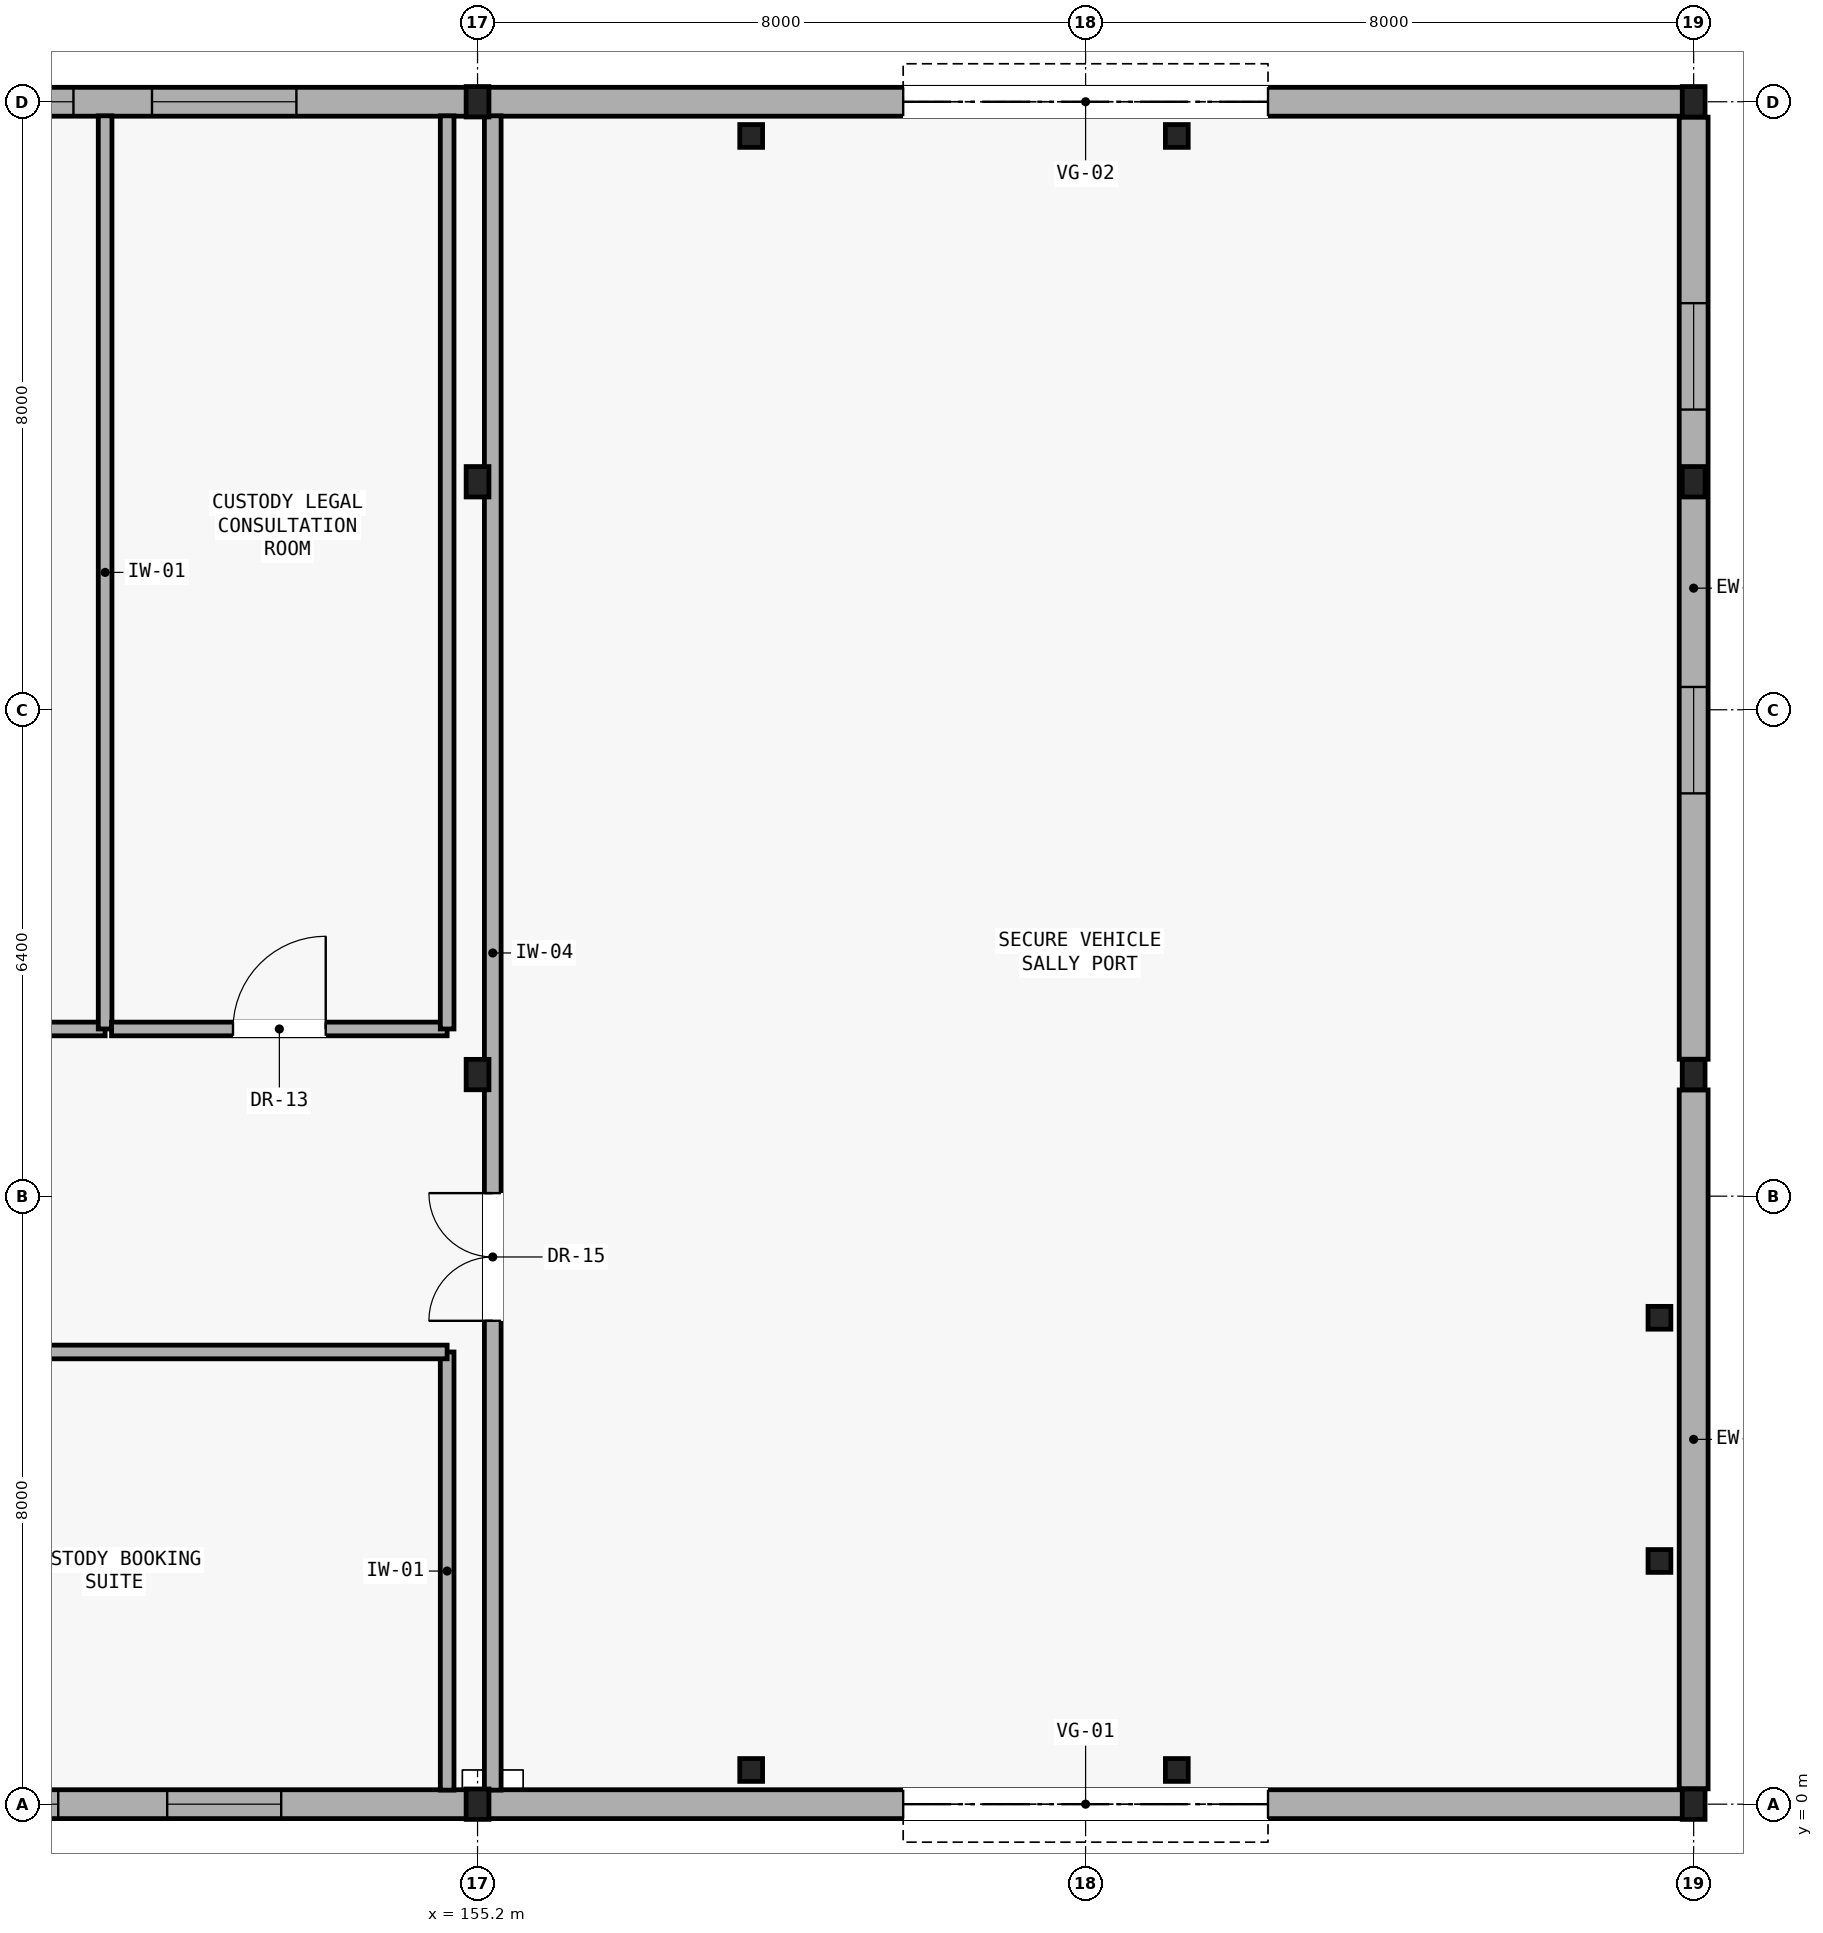
"""IFC4 building model, lengths in metres.
Left out: names, types, materials, properties, quantities, classifications, styles, units other than length and angle.
Written with IfcOpenShell. Run it as: python <this file> out.ifc"""

import sys

from ifc_helpers import new_model, si_unit, direction, frame, frame_2d, origin, origin_2d, place, context, subcontext, project, spatial, rectangle, i_section, extrude, element, fill, save


model = new_model("IFC4")
c1 = context("Model", 3, precision=1e-05, world=origin(), true_north=direction((0.0, 1.0)))
c2 = subcontext(c1, "Body", "Model", "MODEL_VIEW")
j1 = project(units=[si_unit("LENGTHUNIT", "METRE"), si_unit("PLANEANGLEUNIT", "RADIAN")], contexts=[c1])
p1 = place(None, origin())
s1 = spatial("IfcSite", under=j1, at=p1, CompositionType="ELEMENT")
p2 = place(p1, origin())
s2 = spatial("IfcBuilding", under=s1, at=p2, CompositionType="ELEMENT")
p3 = place(p2, origin())
s3 = spatial("IfcBuildingStorey", under=s2, at=p3, CompositionType="ELEMENT", Elevation=0.0)
for number, where, z_axis, x_axis in (
    (1, (155.2, 22.4, -0.27), (0.0, 0.0, 1.0), (1.0, 0.0, 0.0)),
    (2, (155.2, 0.0, -0.27), (0.0, 0.0, 1.0), (1.0, 0.0, 0.0)),
    (3, (155.2, 9.6, -0.27), (0.0, 0.0, 1.0), (1.0, 0.0, 0.0)),
    (4, (155.2, 17.4, -0.27), (0.0, 0.0, 1.0), (1.0, 0.0, 0.0)),
    (5, (171.2, 22.4, -0.27), (0.0, 0.0, 1.0), (1.0, 0.0, 0.0)),
    (6, (171.2, 0.0, -0.27), (0.0, 0.0, 1.0), (1.0, 0.0, 0.0)),
    (7, (171.2, 9.6, -0.27), (0.0, 0.0, 1.0), (1.0, 0.0, 0.0)),
    (8, (171.2, 17.4, -0.27), (0.0, 0.0, 1.0), (1.0, 0.0, 0.0)),
):
    element("IfcColumn", number, at=place(p3, frame(where, z_axis=z_axis, x_axis=x_axis)), inside=s3, PredefinedType="COLUMN", context=c2, shape_type="SweptSolid", body=[
        extrude(i_section(OverallWidth=0.3, OverallDepth=0.4, WebThickness=0.013, FlangeThickness=0.024, FilletRadius=0.027, at=origin_2d()), origin(), (0.0, 0.0, 1.0), 5.52),
    ])
for number, where, z_axis, x_axis in (
    (9, (158.8, 0.45, -0.27), (0.0, 0.0, 1.0), (1.0, 0.0, 0.0)),
    (10, (164.4, 0.45, -0.27), (0.0, 0.0, 1.0), (1.0, 0.0, 0.0)),
    (11, (158.8, 21.95, -0.27), (0.0, 0.0, 1.0), (1.0, 0.0, 0.0)),
    (12, (164.4, 21.95, -0.27), (0.0, 0.0, 1.0), (1.0, 0.0, 0.0)),
):
    element("IfcColumn", number, at=place(p3, frame(where, z_axis=z_axis, x_axis=x_axis)), inside=s3, PredefinedType="COLUMN", context=c2, shape_type="SweptSolid", body=[
        extrude(i_section(OverallWidth=0.3, OverallDepth=0.3, WebThickness=0.011, FlangeThickness=0.019, FilletRadius=0.027, at=origin_2d()), origin(), (0.0, 0.0, 1.0), 3.92),
    ])
for number, where, z_axis, x_axis in (
    (13, (170.75, 3.2, -0.27), (0.0, 0.0, 1.0), (1.0, 0.0, 0.0)),
    (14, (170.75, 6.4, -0.27), (0.0, 0.0, 1.0), (1.0, 0.0, 0.0)),
):
    element("IfcColumn", number, at=place(p3, frame(where, z_axis=z_axis, x_axis=x_axis)), inside=s3, PredefinedType="COLUMN", context=c2, shape_type="SweptSolid", body=[
        extrude(i_section(OverallWidth=0.3, OverallDepth=0.3, WebThickness=0.011, FlangeThickness=0.019, FilletRadius=0.027, at=origin_2d()), origin(), (0.0, 0.0, 1.0), 3.82),
    ])
p4 = place(p3, frame((145.609, 0.0, 0.0), z_axis=(0.0, 0.0, 1.0), x_axis=(1.0, 0.0, 0.0)))
e15 = element("IfcWall", 15, at=p4, inside=s3, PredefinedType="SOLIDWALL", context=c2, shape_type="SweptSolid", body=[
    extrude(rectangle(XDim=9.583, YDim=0.38, at=frame_2d((4.791, 0.0))), origin(), (0.0, 0.0, 1.0), 4.67),
])
p5 = place(p4, frame((2.575, 0.0, 1.7)))
e16 = element("IfcOpeningElement", 16, at=p5, cuts=e15, PredefinedType="OPENING", context=c2, shape_type="SweptSolid", body=[
    extrude(rectangle(XDim=1.5, YDim=0.7, at=frame_2d((0.75, 0.35))), frame((0.0, 0.2, 0.0), z_axis=(0.0, -1.0, 0.0), x_axis=(1.0, 0.0, 0.0)), (0.0, 0.0, 1.0), 0.4),
])
p6 = place(p4, frame((5.508, 0.0, 1.7)))
e17 = element("IfcOpeningElement", 17, at=p6, cuts=e15, PredefinedType="OPENING", context=c2, shape_type="SweptSolid", body=[
    extrude(rectangle(XDim=1.5, YDim=0.7, at=frame_2d((0.75, 0.35))), frame((0.0, 0.2, 0.0), z_axis=(0.0, -1.0, 0.0), x_axis=(1.0, 0.0, 0.0)), (0.0, 0.0, 1.0), 0.4),
])
p7 = place(p3, frame((145.609, 22.4, 0.0), z_axis=(0.0, 0.0, 1.0), x_axis=(1.0, 0.0, 0.0)))
e18 = element("IfcWall", 18, at=p7, inside=s3, PredefinedType="SOLIDWALL", context=c2, shape_type="SweptSolid", body=[
    extrude(rectangle(XDim=9.583, YDim=0.38, at=frame_2d((4.791, 0.0))), origin(), (0.0, 0.0, 1.0), 4.67),
])
p8 = place(p7, frame((2.375, 0.0, 1.7)))
e19 = element("IfcOpeningElement", 19, at=p8, cuts=e18, PredefinedType="OPENING", context=c2, shape_type="SweptSolid", body=[
    extrude(rectangle(XDim=1.9, YDim=0.7, at=frame_2d((0.95, 0.35))), frame((0.0, 0.2, 0.0), z_axis=(0.0, -1.0, 0.0), x_axis=(1.0, 0.0, 0.0)), (0.0, 0.0, 1.0), 0.4),
])
p9 = place(p7, frame((5.308, 0.0, 1.7)))
e20 = element("IfcOpeningElement", 20, at=p9, cuts=e18, PredefinedType="OPENING", context=c2, shape_type="SweptSolid", body=[
    extrude(rectangle(XDim=1.9, YDim=0.7, at=frame_2d((0.95, 0.35))), frame((0.0, 0.2, 0.0), z_axis=(0.0, -1.0, 0.0), x_axis=(1.0, 0.0, 0.0)), (0.0, 0.0, 1.0), 0.4),
])
p10 = place(p3, frame((155.209, 0.0, 0.0), z_axis=(0.0, 0.0, 1.0), x_axis=(1.0, 0.0, 0.0)))
e21 = element("IfcWall", 21, at=p10, inside=s3, PredefinedType="SOLIDWALL", context=c2, shape_type="SweptSolid", body=[
    extrude(rectangle(XDim=15.982, YDim=0.38, at=frame_2d((7.991, 0.0))), origin(), (0.0, 0.0, 1.0), 4.44),
])
p11 = place(p10, frame((5.591, 0.0, 0.0)))
e22 = element("IfcOpeningElement", 22, at=p11, cuts=e21, PredefinedType="OPENING", context=c2, shape_type="SweptSolid", body=[
    extrude(rectangle(XDim=4.8, YDim=3.1, at=frame_2d((2.4, 1.55))), frame((0.0, 0.2, 0.0), z_axis=(0.0, -1.0, 0.0), x_axis=(1.0, 0.0, 0.0)), (0.0, 0.0, 1.0), 0.4),
])
p12 = place(p3, frame((155.209, 22.4, 0.0), z_axis=(0.0, 0.0, 1.0), x_axis=(1.0, 0.0, 0.0)))
e23 = element("IfcWall", 23, at=p12, inside=s3, PredefinedType="SOLIDWALL", context=c2, shape_type="SweptSolid", body=[
    extrude(rectangle(XDim=15.982, YDim=0.38, at=frame_2d((7.991, 0.0))), origin(), (0.0, 0.0, 1.0), 4.44),
])
p13 = place(p12, frame((5.591, 0.0, 0.0)))
e24 = element("IfcOpeningElement", 24, at=p13, cuts=e23, PredefinedType="OPENING", context=c2, shape_type="SweptSolid", body=[
    extrude(rectangle(XDim=4.8, YDim=3.1, at=frame_2d((2.4, 1.55))), frame((0.0, 0.2, 0.0), z_axis=(0.0, -1.0, 0.0), x_axis=(1.0, 0.0, 0.0)), (0.0, 0.0, 1.0), 0.4),
])
p14 = place(p3, frame((171.2, 0.202, 0.0), z_axis=(0.0, 0.0, 1.0), x_axis=(0.0, 1.0, 0.0)))
e25 = element("IfcWall", 25, at=p14, inside=s3, PredefinedType="SOLIDWALL", context=c2, shape_type="SweptSolid", body=[
    extrude(rectangle(XDim=9.196, YDim=0.38, at=frame_2d((4.598, 0.0))), origin(), (0.0, 0.0, 1.0), 4.54),
])
p15 = place(p3, frame((171.2, 9.802, 0.0), z_axis=(0.0, 0.0, 1.0), x_axis=(0.0, 1.0, 0.0)))
e26 = element("IfcWall", 26, at=p15, inside=s3, PredefinedType="SOLIDWALL", context=c2, shape_type="SweptSolid", body=[
    extrude(rectangle(XDim=12.396, YDim=0.38, at=frame_2d((6.198, 0.0))), origin(), (0.0, 0.0, 1.0), 4.54),
])
p16 = place(p15, frame((3.498, 0.0, 1.7)))
e27 = element("IfcOpeningElement", 27, at=p16, cuts=e26, PredefinedType="OPENING", context=c2, shape_type="SweptSolid", body=[
    extrude(rectangle(XDim=1.4, YDim=0.85, at=frame_2d((0.7, 0.425))), frame((0.0, 0.2, 0.0), z_axis=(0.0, -1.0, 0.0), x_axis=(1.0, 0.0, 0.0)), (0.0, 0.0, 1.0), 0.4),
])
p17 = place(p15, frame((8.548, 0.0, 1.7)))
e28 = element("IfcOpeningElement", 28, at=p17, cuts=e26, PredefinedType="OPENING", context=c2, shape_type="SweptSolid", body=[
    extrude(rectangle(XDim=1.4, YDim=0.85, at=frame_2d((0.7, 0.425))), frame((0.0, 0.2, 0.0), z_axis=(0.0, -1.0, 0.0), x_axis=(1.0, 0.0, 0.0)), (0.0, 0.0, 1.0), 0.4),
])
p18 = place(p3, frame((155.4, 22.215, 0.0), z_axis=(0.0, 0.0, 1.0), x_axis=(0.0, -1.0, 0.0)))
e29 = element("IfcWall", 29, at=p18, inside=s3, PredefinedType="PARTITIONING", context=c2, shape_type="SweptSolid", body=[
    extrude(rectangle(XDim=22.03, YDim=0.22, at=frame_2d((11.015, 0.0))), origin(), (0.0, 0.0, 1.0), 4.54),
])
p19 = place(p18, frame((14.175, 0.0, 0.0)))
e30 = element("IfcOpeningElement", 30, at=p19, cuts=e29, PredefinedType="OPENING", context=c2, shape_type="SweptSolid", body=[
    extrude(rectangle(XDim=1.68, YDim=2.2, at=frame_2d((0.84, 1.1))), frame((0.0, 0.12, 0.0), z_axis=(0.0, -1.0, 0.0), x_axis=(1.0, 0.0, 0.0)), (0.0, 0.0, 1.0), 0.24),
])
p20 = place(p3, frame((154.8, 0.185, 0.0), z_axis=(0.0, 0.0, 1.0), x_axis=(0.0, 1.0, 0.0)))
e31 = element("IfcWall", 31, at=p20, inside=s3, PredefinedType="PARTITIONING", context=c2, shape_type="SweptSolid", body=[
    extrude(rectangle(XDim=5.765, YDim=0.18, at=frame_2d((2.882, 0.0))), origin(), (0.0, 0.0, 1.0), 5.0),
])
p21 = place(p3, frame((154.8, 5.95, 0.0), z_axis=(0.0, 0.0, 1.0), x_axis=(-1.0, 0.0, 0.0)))
e32 = element("IfcWall", 32, at=p21, inside=s3, PredefinedType="PARTITIONING", context=c2, shape_type="SweptSolid", body=[
    extrude(rectangle(XDim=12.5, YDim=0.18, at=frame_2d((6.25, 0.0))), origin(), (0.0, 0.0, 1.0), 5.0),
])
p22 = place(p21, frame((5.64, 0.0, 0.0)))
e33 = element("IfcOpeningElement", 33, at=p22, cuts=e32, PredefinedType="OPENING", context=c2, shape_type="SweptSolid", body=[
    extrude(rectangle(XDim=1.22, YDim=2.1, at=frame_2d((0.61, 1.05))), frame((0.0, 0.1, 0.0), z_axis=(0.0, -1.0, 0.0), x_axis=(1.0, 0.0, 0.0)), (0.0, 0.0, 1.0), 0.2),
])
p23 = place(p3, frame((146.2, 10.2, 0.0), z_axis=(0.0, 0.0, 1.0), x_axis=(1.0, 0.0, 0.0)))
e34 = element("IfcWall", 34, at=p23, inside=s3, PredefinedType="PARTITIONING", context=c2, shape_type="SweptSolid", body=[
    extrude(rectangle(XDim=4.1, YDim=0.18, at=frame_2d((2.05, 0.0))), origin(), (0.0, 0.0, 1.0), 5.0),
])
p24 = place(p23, frame((1.44, 0.0, 0.0)))
e35 = element("IfcOpeningElement", 35, at=p24, cuts=e34, PredefinedType="OPENING", context=c2, shape_type="SweptSolid", body=[
    extrude(rectangle(XDim=1.22, YDim=2.1, at=frame_2d((0.61, 1.05))), frame((0.0, 0.1, 0.0), z_axis=(0.0, -1.0, 0.0), x_axis=(1.0, 0.0, 0.0)), (0.0, 0.0, 1.0), 0.2),
])
p25 = place(p3, frame((150.3, 10.2, 0.0), z_axis=(0.0, 0.0, 1.0), x_axis=(0.0, 1.0, 0.0)))
e36 = element("IfcWall", 36, at=p25, inside=s3, PredefinedType="PARTITIONING", context=c2, shape_type="SweptSolid", body=[
    extrude(rectangle(XDim=12.015, YDim=0.18, at=frame_2d((6.008, 0.0))), origin(), (0.0, 0.0, 1.0), 5.0),
])
p26 = place(p3, frame((150.385, 10.2, 0.0), z_axis=(0.0, 0.0, 1.0), x_axis=(1.0, 0.0, 0.0)))
e37 = element("IfcWall", 37, at=p26, inside=s3, PredefinedType="PARTITIONING", context=c2, shape_type="SweptSolid", body=[
    extrude(rectangle(XDim=4.415, YDim=0.18, at=frame_2d((2.208, 0.0))), origin(), (0.0, 0.0, 1.0), 5.0),
])
p27 = place(p26, frame((1.597, 0.0, 0.0)))
e38 = element("IfcOpeningElement", 38, at=p27, cuts=e37, PredefinedType="OPENING", context=c2, shape_type="SweptSolid", body=[
    extrude(rectangle(XDim=1.22, YDim=2.1, at=frame_2d((0.61, 1.05))), frame((0.0, 0.1, 0.0), z_axis=(0.0, -1.0, 0.0), x_axis=(1.0, 0.0, 0.0)), (0.0, 0.0, 1.0), 0.2),
])
p28 = place(p3, frame((154.8, 10.2, 0.0), z_axis=(0.0, 0.0, 1.0), x_axis=(0.0, 1.0, 0.0)))
e39 = element("IfcWall", 39, at=p28, inside=s3, PredefinedType="PARTITIONING", context=c2, shape_type="SweptSolid", body=[
    extrude(rectangle(XDim=12.015, YDim=0.18, at=frame_2d((6.008, 0.0))), origin(), (0.0, 0.0, 1.0), 5.0),
])
p29 = place(p5, origin())
e40 = element("IfcWindow", 40, at=p29, inside=s3, PartitioningType="SINGLE_PANEL", PredefinedType="WINDOW", context=c2, shape_type="SweptSolid", body=[
    extrude(rectangle(XDim=1.5, YDim=0.7, at=frame_2d((0.75, 0.35))), frame((0.0, 0.03, 0.0), z_axis=(0.0, -1.0, 0.0), x_axis=(1.0, 0.0, 0.0)), (0.0, 0.0, 1.0), 0.06),
])
fill(e16, e40)
p30 = place(p6, origin())
e41 = element("IfcWindow", 41, at=p30, inside=s3, PartitioningType="SINGLE_PANEL", PredefinedType="WINDOW", context=c2, shape_type="SweptSolid", body=[
    extrude(rectangle(XDim=1.5, YDim=0.7, at=frame_2d((0.75, 0.35))), frame((0.0, 0.03, 0.0), z_axis=(0.0, -1.0, 0.0), x_axis=(1.0, 0.0, 0.0)), (0.0, 0.0, 1.0), 0.06),
])
fill(e17, e41)
p31 = place(p8, origin())
e42 = element("IfcWindow", 42, at=p31, inside=s3, PartitioningType="SINGLE_PANEL", PredefinedType="WINDOW", context=c2, shape_type="SweptSolid", body=[
    extrude(rectangle(XDim=1.9, YDim=0.7, at=frame_2d((0.95, 0.35))), frame((0.0, 0.03, 0.0), z_axis=(0.0, -1.0, 0.0), x_axis=(1.0, 0.0, 0.0)), (0.0, 0.0, 1.0), 0.06),
])
fill(e19, e42)
p32 = place(p9, origin())
e43 = element("IfcWindow", 43, at=p32, inside=s3, PartitioningType="SINGLE_PANEL", PredefinedType="WINDOW", context=c2, shape_type="SweptSolid", body=[
    extrude(rectangle(XDim=1.9, YDim=0.7, at=frame_2d((0.95, 0.35))), frame((0.0, 0.03, 0.0), z_axis=(0.0, -1.0, 0.0), x_axis=(1.0, 0.0, 0.0)), (0.0, 0.0, 1.0), 0.06),
])
fill(e20, e43)
p33 = place(p11, frame((4.8, 0.0, 0.0), z_axis=(0.0, 0.0, 1.0), x_axis=(-1.0, 0.0, 0.0)))
e44 = element("IfcDoor", 44, at=p33, inside=s3, OperationType="SINGLE_SWING_LEFT", PredefinedType="USERDEFINED", context=c2, shape_type="SweptSolid", body=[
    extrude(rectangle(XDim=4.8, YDim=3.1, at=frame_2d((2.4, 1.55))), frame((0.0, 0.025, 0.0), z_axis=(0.0, -1.0, 0.0), x_axis=(1.0, 0.0, 0.0)), (0.0, 0.0, 1.0), 0.05),
])
fill(e22, e44)
p34 = place(p13, origin())
e45 = element("IfcDoor", 45, at=p34, inside=s3, OperationType="SINGLE_SWING_LEFT", PredefinedType="USERDEFINED", context=c2, shape_type="SweptSolid", body=[
    extrude(rectangle(XDim=4.8, YDim=3.1, at=frame_2d((2.4, 1.55))), frame((0.0, 0.025, 0.0), z_axis=(0.0, -1.0, 0.0), x_axis=(1.0, 0.0, 0.0)), (0.0, 0.0, 1.0), 0.05),
])
fill(e24, e45)
p35 = place(p16, origin())
e46 = element("IfcWindow", 46, at=p35, inside=s3, PartitioningType="SINGLE_PANEL", PredefinedType="WINDOW", context=c2, shape_type="SweptSolid", body=[
    extrude(rectangle(XDim=1.4, YDim=0.85, at=frame_2d((0.7, 0.425))), frame((0.0, 0.03, 0.0), z_axis=(0.0, -1.0, 0.0), x_axis=(1.0, 0.0, 0.0)), (0.0, 0.0, 1.0), 0.06),
])
fill(e27, e46)
p36 = place(p17, origin())
e47 = element("IfcWindow", 47, at=p36, inside=s3, PartitioningType="SINGLE_PANEL", PredefinedType="WINDOW", context=c2, shape_type="SweptSolid", body=[
    extrude(rectangle(XDim=1.4, YDim=0.85, at=frame_2d((0.7, 0.425))), frame((0.0, 0.03, 0.0), z_axis=(0.0, -1.0, 0.0), x_axis=(1.0, 0.0, 0.0)), (0.0, 0.0, 1.0), 0.06),
])
fill(e28, e47)
p37 = place(p19, frame((1.68, 0.0, 0.0), z_axis=(0.0, 0.0, 1.0), x_axis=(-1.0, 0.0, 0.0)))
e48 = element("IfcDoor", 48, at=p37, inside=s3, OperationType="DOUBLE_DOOR_SINGLE_SWING", PredefinedType="DOOR", context=c2, shape_type="SweptSolid", body=[
    extrude(rectangle(XDim=1.68, YDim=2.2, at=frame_2d((0.84, 1.1))), frame((0.0, 0.025, 0.0), z_axis=(0.0, -1.0, 0.0), x_axis=(1.0, 0.0, 0.0)), (0.0, 0.0, 1.0), 0.05),
])
fill(e30, e48)
p38 = place(p27, origin())
e49 = element("IfcDoor", 49, at=p38, inside=s3, OperationType="SINGLE_SWING_RIGHT", PredefinedType="DOOR", context=c2, shape_type="SweptSolid", body=[
    extrude(rectangle(XDim=1.22, YDim=2.1, at=frame_2d((0.61, 1.05))), frame((0.0, 0.025, 0.0), z_axis=(0.0, -1.0, 0.0), x_axis=(1.0, 0.0, 0.0)), (0.0, 0.0, 1.0), 0.05),
])
fill(e38, e49)
save(model, sys.argv[1])
